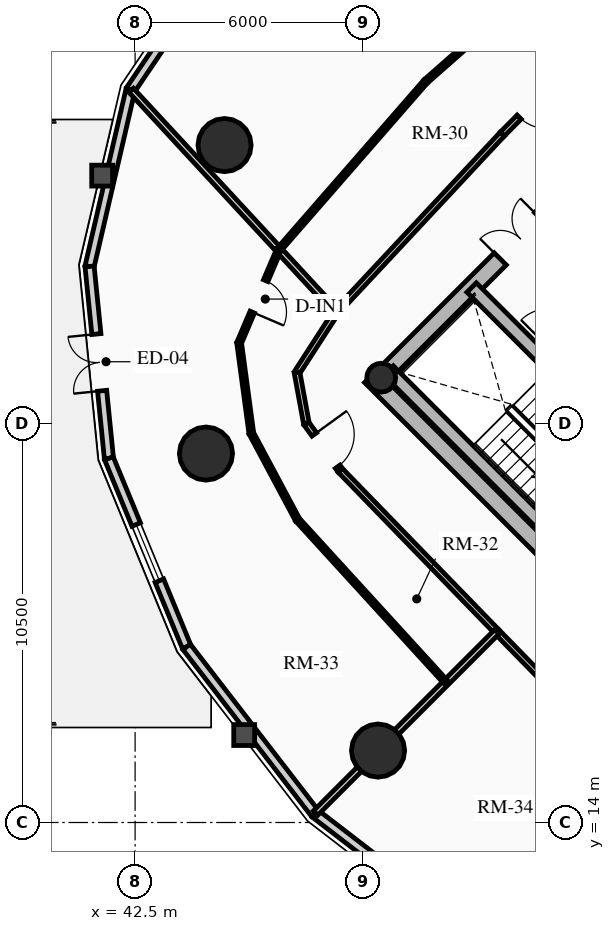
"""IFC4 building model, lengths in metres.
Left out: names, types, materials, properties, quantities, classifications, styles, units other than length and angle.
Written with IfcOpenShell. Run it as: python <this file> out.ifc"""

import sys

from ifc_helpers import new_model, si_unit, direction, frame, frame_2d, origin, origin_2d, place, context, subcontext, project, spatial, rectangle, circle, hollow_circle, extrude, source, transform, mapped, element, fill, save


model = new_model("IFC4")
c1 = context("Model", 3, precision=1e-05, world=origin(), true_north=direction((0.0, 1.0)))
c2 = subcontext(c1, "Body", "Model", "MODEL_VIEW")
j1 = project(units=[si_unit("LENGTHUNIT", "METRE"), si_unit("PLANEANGLEUNIT", "RADIAN")], contexts=[c1])
p1 = place(None, origin())
s1 = spatial("IfcSite", under=j1, at=p1, CompositionType="ELEMENT")
p2 = place(p1, origin())
s2 = spatial("IfcBuilding", under=s1, at=p2, CompositionType="ELEMENT")
p3 = place(p2, frame((0.0, 0.0, 144.04)))
s3 = spatial("IfcBuildingStorey", under=s2, at=p3, CompositionType="ELEMENT", Elevation=144.04)
p4 = place(p3, frame((58.737, 15.697, 0.0), z_axis=(0.0, 0.0, 1.0), x_axis=(-0.707106781187, 0.707106781187, 0.0)))
e1 = element("IfcWall", 1, at=p4, inside=s3, PredefinedType="SHEAR", context=c2, shape_type="SweptSolid", body=[
    extrude(rectangle(XDim=14.2, YDim=0.45, at=frame_2d((7.1, 0.0))), origin(), (0.0, 0.0, 1.0), 3.06),
])
p5 = place(p3, frame((48.856, 25.578, 0.0), z_axis=(0.0, 0.0, 1.0), x_axis=(0.707106781187, 0.707106781187, 0.0)))
e2 = element("IfcWall", 2, at=p5, inside=s3, PredefinedType="SHEAR", context=c2, shape_type="SweptSolid", body=[
    extrude(rectangle(XDim=10.7, YDim=0.45, at=frame_2d((5.35, 0.0))), origin(), (0.0, 0.0, 1.0), 3.06),
])
m1 = source(origin(), c2, "Body", "SweptSolid", [
    extrude(rectangle(XDim=1.5, YDim=2.02, at=frame_2d((0.75, 1.01))), frame((0.0, 0.235, 0.0), z_axis=(0.0, -1.0, 0.0), x_axis=(1.0, 0.0, 0.0)), (0.0, 0.0, 1.0), 0.47),
])
p6 = place(p5, frame((4.6, 0.0, 0.0)))
e3 = element("IfcOpeningElement", 3, at=p6, cuts=e2, PredefinedType="OPENING", context=c2, shape_type="MappedRepresentation", body=[
    mapped(m1, transform((0.0, 0.0, 0.0), x_axis=(1.0, 0.0, 0.0), y_axis=(0.0, 1.0, 0.0), z_axis=(0.0, 0.0, 1.0), scale=1.0)),
])
p7 = place(p3, frame((61.078, 18.355, 0.0), z_axis=(0.0, 0.0, 1.0), x_axis=(-0.707106781187, 0.707106781187, 0.0)))
e4 = element("IfcWall", 4, at=p7, inside=s3, PredefinedType="SHEAR", context=c2, shape_type="SweptSolid", body=[
    extrude(rectangle(XDim=13.75, YDim=0.35, at=frame_2d((6.875, 0.0))), origin(), (0.0, 0.0, 1.0), 3.06),
])
m2 = source(origin(), c2, "Body", "SweptSolid", [
    extrude(rectangle(XDim=1.1, YDim=2.015, at=frame_2d((0.55, 1.007))), frame((0.0, 0.185, 0.0), z_axis=(0.0, -1.0, 0.0), x_axis=(1.0, 0.0, 0.0)), (0.0, 0.0, 1.0), 0.37),
])
p8 = place(p7, frame((4.875, 0.0, 0.0)))
e5 = element("IfcOpeningElement", 5, at=p8, cuts=e4, PredefinedType="OPENING", context=c2, shape_type="MappedRepresentation", body=[
    mapped(m2, transform((0.0, 0.0, 0.0), x_axis=(1.0, 0.0, 0.0), y_axis=(0.0, 1.0, 0.0), z_axis=(0.0, 0.0, 1.0), scale=1.0)),
])
p9 = place(p7, frame((0.65, 0.0, 0.0)))
e6 = element("IfcOpeningElement", 6, at=p9, cuts=e4, PredefinedType="OPENING", context=c2, shape_type="MappedRepresentation", body=[
    mapped(m2, transform((0.0, 0.0, 0.0), x_axis=(1.0, 0.0, 0.0), y_axis=(0.0, 1.0, 0.0), z_axis=(0.0, 0.0, 1.0), scale=1.0)),
])
p10 = place(p7, frame((2.65, 0.0, 0.0)))
e7 = element("IfcOpeningElement", 7, at=p10, cuts=e4, PredefinedType="OPENING", context=c2, shape_type="MappedRepresentation", body=[
    mapped(m2, transform((0.0, 0.0, 0.0), x_axis=(1.0, 0.0, 0.0), y_axis=(0.0, 1.0, 0.0), z_axis=(0.0, 0.0, 1.0), scale=1.0)),
])
m3 = source(origin(), c2, "Body", "SweptSolid", [
    extrude(rectangle(XDim=1.15, YDim=2.02, at=frame_2d((0.575, 1.01))), frame((0.0, 0.185, 0.0), z_axis=(0.0, -1.0, 0.0), x_axis=(1.0, 0.0, 0.0)), (0.0, 0.0, 1.0), 0.37),
])
p11 = place(p7, frame((7.295, 0.0, 0.0)))
e8 = element("IfcOpeningElement", 8, at=p11, cuts=e4, PredefinedType="OPENING", context=c2, shape_type="MappedRepresentation", body=[
    mapped(m3, transform((0.0, 0.0, 0.0), x_axis=(1.0, 0.0, 0.0), y_axis=(0.0, 1.0, 0.0), z_axis=(0.0, 0.0, 1.0), scale=1.0)),
])
p12 = place(p3, frame((53.922, 21.141, 0.0), z_axis=(0.0, 0.0, 1.0), x_axis=(-0.707088616009, 0.707124945897, 0.0)))
e9 = element("IfcWall", 9, at=p12, inside=s3, PredefinedType="SHEAR", context=c2, shape_type="SweptSolid", body=[
    extrude(rectangle(XDim=6.72, YDim=0.35, at=frame_2d((3.36, 0.0))), origin(), (0.0, 0.0, 1.0), 3.06),
])
p13 = place(p3, frame((48.976, 25.706, 0.0), z_axis=(0.0, 0.0, 1.0), x_axis=(0.707106781187, 0.707106781187, 0.0)))
e10 = element("IfcColumn", 10, at=p13, inside=s3, PredefinedType="COLUMN", context=c2, shape_type="SweptSolid", body=[
    extrude(hollow_circle(Radius=0.38, WallThickness=0.032, at=origin_2d()), origin(), (0.0, 0.0, 1.0), 3.06),
])
for number, where, z_axis, x_axis in (
    (11, (44.854, 31.827, 0.0), (0.0, 0.0, 1.0), (1.0, 0.0, 0.0)),
    (12, (44.365, 23.709, 0.0), (0.0, 0.0, 1.0), (1.0, 0.0, 0.0)),
    (13, (48.893, 15.893, 0.0), (0.0, 0.0, 1.0), (1.0, 0.0, 0.0)),
):
    element("IfcColumn", number, at=place(p3, frame(where, z_axis=z_axis, x_axis=x_axis)), inside=s3, PredefinedType="USERDEFINED", context=c2, shape_type="SweptSolid", body=[
        extrude(circle(Radius=0.7, at=origin_2d()), origin(), (0.0, 0.0, 1.0), 3.06),
    ])
p14 = place(p3, frame((42.378, 33.279, 0.0), z_axis=(0.0, 0.0, 1.0), x_axis=(0.559635286042, 0.828739009952, 0.0)))
e14 = element("IfcWall", 14, at=p14, inside=s3, PredefinedType="SOLIDWALL", context=c2, shape_type="SweptSolid", body=[
    extrude(rectangle(XDim=4.569, YDim=0.24, at=frame_2d((2.284, 0.0))), origin(), (0.0, 0.0, 1.0), 2.229),
])
m4 = source(origin(), c2, "Body", "SweptSolid", [
    extrude(rectangle(XDim=1.6, YDim=1.3, at=frame_2d((0.8, 0.65))), frame((0.0, 0.13, 0.0), z_axis=(0.0, -1.0, 0.0), x_axis=(1.0, 0.0, 0.0)), (0.0, 0.0, 1.0), 0.26),
])
p15 = place(p14, frame((1.484, 0.0, 0.65)))
e15 = element("IfcOpeningElement", 15, at=p15, cuts=e14, PredefinedType="OPENING", context=c2, shape_type="MappedRepresentation", body=[
    mapped(m4, transform((0.0, 0.0, 0.0), x_axis=(1.0, 0.0, 0.0), y_axis=(0.0, 1.0, 0.0), z_axis=(0.0, 0.0, 1.0), scale=1.0)),
])
p16 = place(p3, frame((41.302, 28.633, 0.0), z_axis=(0.0, 0.0, 1.0), x_axis=(0.225659540039, 0.974206226622, 0.0)))
e16 = element("IfcWall", 16, at=p16, inside=s3, PredefinedType="SOLIDWALL", context=c2, shape_type="SweptSolid", body=[
    extrude(rectangle(XDim=4.769, YDim=0.24, at=frame_2d((2.385, 0.0))), origin(), (0.0, 0.0, 1.0), 2.229),
])
p17 = place(p3, frame((41.811, 23.582, 0.0), z_axis=(0.0, 0.0, 1.0), x_axis=(-0.100279889424, 0.994959267396, 0.0)))
e17 = element("IfcWall", 17, at=p17, inside=s3, PredefinedType="SOLIDWALL", context=c2, shape_type="SweptSolid", body=[
    extrude(rectangle(XDim=5.076, YDim=0.24, at=frame_2d((2.538, 0.0))), origin(), (0.0, 0.0, 1.0), 2.229),
])
m5 = source(origin(), c2, "Body", "SweptSolid", [
    extrude(rectangle(XDim=1.5, YDim=2.015, at=frame_2d((0.75, 1.007))), frame((0.0, 0.13, 0.0), z_axis=(0.0, -1.0, 0.0), x_axis=(1.0, 0.0, 0.0)), (0.0, 0.0, 1.0), 0.26),
])
p18 = place(p17, frame((1.788, 0.0, 0.0)))
e18 = element("IfcOpeningElement", 18, at=p18, cuts=e17, PredefinedType="OPENING", context=c2, shape_type="MappedRepresentation", body=[
    mapped(m5, transform((0.0, 0.0, 0.0), x_axis=(1.0, 0.0, 0.0), y_axis=(0.0, 1.0, 0.0), z_axis=(0.0, 0.0, 1.0), scale=1.0)),
])
p19 = place(p3, frame((43.856, 18.622, 0.0), z_axis=(0.0, 0.0, 1.0), x_axis=(-0.38111364655, 0.924528197738, 0.0)))
e19 = element("IfcWall", 19, at=p19, inside=s3, PredefinedType="SOLIDWALL", context=c2, shape_type="SweptSolid", body=[
    extrude(rectangle(XDim=5.366, YDim=0.24, at=frame_2d((2.683, 0.0))), origin(), (0.0, 0.0, 1.0), 2.229),
])
p20 = place(p19, frame((1.883, 0.0, 0.65)))
e20 = element("IfcOpeningElement", 20, at=p20, cuts=e19, PredefinedType="OPENING", context=c2, shape_type="MappedRepresentation", body=[
    mapped(m4, transform((0.0, 0.0, 0.0), x_axis=(1.0, 0.0, 0.0), y_axis=(0.0, 1.0, 0.0), z_axis=(0.0, 0.0, 1.0), scale=1.0)),
])
p21 = place(p3, frame((47.236, 14.236, 0.0), z_axis=(0.0, 0.0, 1.0), x_axis=(-0.610543584779, 0.791982658323, 0.0)))
e21 = element("IfcWall", 21, at=p21, inside=s3, PredefinedType="SOLIDWALL", context=c2, shape_type="SweptSolid", body=[
    extrude(rectangle(XDim=5.537, YDim=0.24, at=frame_2d((2.769, 0.0))), origin(), (0.0, 0.0, 1.0), 2.229),
])
p22 = place(p3, frame((51.622, 10.856, 0.0), z_axis=(0.0, 0.0, 1.0), x_axis=(-0.791982658323, 0.610543584779, 0.0)))
e22 = element("IfcWall", 22, at=p22, inside=s3, PredefinedType="SOLIDWALL", context=c2, shape_type="SweptSolid", body=[
    extrude(rectangle(XDim=5.537, YDim=0.24, at=frame_2d((2.769, 0.0))), origin(), (0.0, 0.0, 1.0), 2.229),
])
p23 = place(p22, frame((1.968, 0.0, 0.65)))
e23 = element("IfcOpeningElement", 23, at=p23, cuts=e22, PredefinedType="OPENING", context=c2, shape_type="MappedRepresentation", body=[
    mapped(m4, transform((0.0, 0.0, 0.0), x_axis=(1.0, 0.0, 0.0), y_axis=(0.0, 1.0, 0.0), z_axis=(0.0, 0.0, 1.0), scale=1.0)),
])
p24 = place(p3, frame((54.501, 34.479, 0.0), z_axis=(0.0, 0.0, 1.0), x_axis=(-0.70346073929, -0.710734119258, 0.0)))
e24 = element("IfcWall", 24, at=p24, inside=s3, PredefinedType="PARTITIONING", context=c2, shape_type="SweptSolid", body=[
    extrude(rectangle(XDim=3.323, YDim=0.15, at=frame_2d((1.662, 0.0))), origin(), (0.0, 0.0, 1.0), 2.275),
])
m6 = source(origin(), c2, "Body", "SweptSolid", [
    extrude(rectangle(XDim=1.05, YDim=2.015, at=frame_2d((0.525, 1.007))), frame((0.0, 0.085, 0.0), z_axis=(0.0, -1.0, 0.0), x_axis=(1.0, 0.0, 0.0)), (0.0, 0.0, 1.0), 0.17),
])
p25 = place(p24, frame((1.645, 0.0, 0.0)))
e25 = element("IfcOpeningElement", 25, at=p25, cuts=e24, PredefinedType="OPENING", context=c2, shape_type="MappedRepresentation", body=[
    mapped(m6, transform((0.0, 0.0, 0.0), x_axis=(1.0, 0.0, 0.0), y_axis=(0.0, 1.0, 0.0), z_axis=(0.0, 0.0, 1.0), scale=1.0)),
])
p26 = place(p3, frame((52.163, 32.117, 0.0), z_axis=(0.0, 0.0, 1.0), x_axis=(-0.682485296115, -0.730899323154, 0.0)))
e26 = element("IfcWall", 26, at=p26, inside=s3, PredefinedType="PARTITIONING", context=c2, shape_type="SweptSolid", body=[
    extrude(rectangle(XDim=6.404, YDim=0.15, at=frame_2d((3.202, 0.0))), origin(), (0.0, 0.0, 1.0), 2.275),
])
p27 = place(p3, frame((47.792, 27.436, 0.0), z_axis=(0.0, 0.0, 1.0), x_axis=(-0.543086162542, -0.839676973637, 0.0)))
e27 = element("IfcWall", 27, at=p27, inside=s3, PredefinedType="PARTITIONING", context=c2, shape_type="SweptSolid", body=[
    extrude(rectangle(XDim=1.901, YDim=0.15, at=frame_2d((0.95, 0.0))), origin(), (0.0, 0.0, 1.0), 2.275),
])
p28 = place(p3, frame((46.76, 25.84, 0.0), z_axis=(0.0, 0.0, 1.0), x_axis=(0.181230731673, -0.983440604153, 0.0)))
e28 = element("IfcWall", 28, at=p28, inside=s3, PredefinedType="PARTITIONING", context=c2, shape_type="SweptSolid", body=[
    extrude(rectangle(XDim=1.365, YDim=0.15, at=frame_2d((0.682, 0.0))), origin(), (0.0, 0.0, 1.0), 2.275),
])
p29 = place(p3, frame((47.008, 24.498, 0.0), z_axis=(0.0, 0.0, 1.0), x_axis=(0.586941299514, -0.809629489906, 0.0)))
e29 = element("IfcWall", 29, at=p29, inside=s3, PredefinedType="PARTITIONING", context=c2, shape_type="SweptSolid", body=[
    extrude(rectangle(XDim=1.523, YDim=0.15, at=frame_2d((0.761, 0.0))), origin(), (0.0, 0.0, 1.0), 2.275),
])
p30 = place(p29, frame((0.353, 0.0, 0.0)))
e30 = element("IfcOpeningElement", 30, at=p30, cuts=e29, PredefinedType="OPENING", context=c2, shape_type="MappedRepresentation", body=[
    mapped(m6, transform((0.0, 0.0, 0.0), x_axis=(1.0, 0.0, 0.0), y_axis=(0.0, 1.0, 0.0), z_axis=(0.0, 0.0, 1.0), scale=1.0)),
])
p31 = place(p3, frame((47.901, 23.265, 0.0), z_axis=(0.0, 0.0, 1.0), x_axis=(0.696355965374, -0.717696572019, 0.0)))
e31 = element("IfcWall", 31, at=p31, inside=s3, PredefinedType="PARTITIONING", context=c2, shape_type="SweptSolid", body=[
    extrude(rectangle(XDim=5.915, YDim=0.15, at=frame_2d((2.957, 0.0))), origin(), (0.0, 0.0, 1.0), 2.705),
])
p32 = place(p3, frame((52.02, 19.02, 0.0), z_axis=(0.0, 0.0, 1.0), x_axis=(0.699456449804, -0.71467522332, 0.0)))
e32 = element("IfcWall", 32, at=p32, inside=s3, PredefinedType="PARTITIONING", context=c2, shape_type="SweptSolid", body=[
    extrude(rectangle(XDim=6.032, YDim=0.15, at=frame_2d((3.016, 0.0))), origin(), (0.0, 0.0, 1.0), 2.275),
])
p33 = place(p3, frame((47.792, 27.436, 0.0), z_axis=(0.0, 0.0, 1.0), x_axis=(-0.679077160958, 0.734066897132, 0.0)))
e33 = element("IfcWall", 33, at=p33, inside=s3, PredefinedType="PARTITIONING", context=c2, shape_type="SweptSolid", body=[
    extrude(rectangle(XDim=7.947, YDim=0.16, at=frame_2d((3.974, 0.0))), origin(), (0.0, 0.0, 1.0), 2.229),
])
p34 = place(p3, frame((52.02, 19.02, 0.0), z_axis=(0.0, 0.0, 1.0), x_axis=(-0.707106781187, -0.707106781187, 0.0)))
e34 = element("IfcWall", 34, at=p34, inside=s3, PredefinedType="PARTITIONING", context=c2, shape_type="SweptSolid", body=[
    extrude(rectangle(XDim=6.745, YDim=0.16, at=frame_2d((3.373, 0.0))), origin(), (0.0, 0.0, 1.0), 2.229),
])
p35 = place(p3, frame((52.885, 35.914, 0.0), z_axis=(0.0, 0.0, 1.0), x_axis=(-0.750358205808, -0.66103143872, 0.0)))
e35 = element("IfcWall", 35, at=p35, inside=s3, PredefinedType="PARTITIONING", context=c2, shape_type="SweptSolid", body=[
    extrude(rectangle(XDim=3.654, YDim=0.125, at=frame_2d((1.827, 0.0))), origin(), (0.0, 0.0, 1.0), 2.275),
])
p36 = place(p3, frame((50.143, 33.498, 0.0), z_axis=(0.0, 0.0, 1.0), x_axis=(-0.657179989236, -0.753733680916, 0.0)))
e36 = element("IfcWall", 36, at=p36, inside=s3, PredefinedType="PARTITIONING", context=c2, shape_type="SweptSolid", body=[
    extrude(rectangle(XDim=5.876, YDim=0.125, at=frame_2d((2.938, 0.0))), origin(), (0.0, 0.0, 1.0), 2.275),
])
p37 = place(p3, frame((46.281, 29.069, 0.0), z_axis=(0.0, 0.0, 1.0), x_axis=(-0.392313487189, -0.919831575762, 0.0)))
e37 = element("IfcWall", 37, at=p37, inside=s3, PredefinedType="PARTITIONING", context=c2, shape_type="SweptSolid", body=[
    extrude(rectangle(XDim=2.662, YDim=0.125, at=frame_2d((1.331, 0.0))), origin(), (0.0, 0.0, 1.0), 2.275),
])
m7 = source(origin(), c2, "Body", "SweptSolid", [
    extrude(rectangle(XDim=0.9, YDim=2.005, at=frame_2d((0.45, 1.002))), frame((0.0, 0.073, 0.0), z_axis=(0.0, -1.0, 0.0), x_axis=(1.0, 0.0, 0.0)), (0.0, 0.0, 1.0), 0.145),
])
p38 = place(p37, frame((0.881, 0.0, 0.0)))
e38 = element("IfcOpeningElement", 38, at=p38, cuts=e37, PredefinedType="OPENING", context=c2, shape_type="MappedRepresentation", body=[
    mapped(m7, transform((0.0, 0.0, 0.0), x_axis=(1.0, 0.0, 0.0), y_axis=(0.0, 1.0, 0.0), z_axis=(0.0, 0.0, 1.0), scale=1.0)),
])
p39 = place(p3, frame((45.237, 26.621, 0.0), z_axis=(0.0, 0.0, 1.0), x_axis=(0.133669484876, -0.991025967779, 0.0)))
e39 = element("IfcWall", 39, at=p39, inside=s3, PredefinedType="PARTITIONING", context=c2, shape_type="SweptSolid", body=[
    extrude(rectangle(XDim=2.4, YDim=0.125, at=frame_2d((1.2, 0.0))), origin(), (0.0, 0.0, 1.0), 2.275),
])
p40 = place(p3, frame((45.558, 24.242, 0.0), z_axis=(0.0, 0.0, 1.0), x_axis=(0.471241457076, -0.88200424553, 0.0)))
e40 = element("IfcWall", 40, at=p40, inside=s3, PredefinedType="PARTITIONING", context=c2, shape_type="SweptSolid", body=[
    extrude(rectangle(XDim=2.58, YDim=0.125, at=frame_2d((1.29, 0.0))), origin(), (0.0, 0.0, 1.0), 2.275),
])
p41 = place(p3, frame((46.774, 21.967, 0.0), z_axis=(0.0, 0.0, 1.0), x_axis=(0.674324259609, -0.738435368129, 0.0)))
e41 = element("IfcWall", 41, at=p41, inside=s3, PredefinedType="PARTITIONING", context=c2, shape_type="SweptSolid", body=[
    extrude(rectangle(XDim=5.8, YDim=0.125, at=frame_2d((2.9, 0.0))), origin(), (0.0, 0.0, 1.0), 2.705),
])
m8 = source(origin(), c2, "Body", "SweptSolid", [
    extrude(rectangle(XDim=1.6, YDim=1.3, at=frame_2d((0.8, 0.65))), frame((0.0, 0.03, 0.0), z_axis=(0.0, -1.0, 0.0), x_axis=(1.0, 0.0, 0.0)), (0.0, 0.0, 1.0), 0.06),
])
p42 = place(p20, origin())
e42 = element("IfcWindow", 42, at=p42, inside=s3, PartitioningType="SINGLE_PANEL", PredefinedType="WINDOW", context=c2, shape_type="MappedRepresentation", body=[
    mapped(m8, transform((0.0, 0.0, 0.0), x_axis=(1.0, 0.0, 0.0), y_axis=(0.0, 1.0, 0.0), z_axis=(0.0, 0.0, 1.0), scale=1.0)),
])
fill(e20, e42)
m9 = source(origin(), c2, "Body", "SweptSolid", [
    extrude(rectangle(XDim=1.5, YDim=2.015, at=frame_2d((0.75, 1.007))), frame((0.0, 0.025, 0.0), z_axis=(0.0, -1.0, 0.0), x_axis=(1.0, 0.0, 0.0)), (0.0, 0.0, 1.0), 0.05),
])
p43 = place(p18, origin())
e43 = element("IfcDoor", 43, at=p43, inside=s3, OperationType="DOUBLE_DOOR_SINGLE_SWING", PredefinedType="DOOR", context=c2, shape_type="MappedRepresentation", body=[
    mapped(m9, transform((0.0, 0.0, 0.0), x_axis=(1.0, 0.0, 0.0), y_axis=(0.0, 1.0, 0.0), z_axis=(0.0, 0.0, 1.0), scale=1.0)),
])
fill(e18, e43)
m10 = source(origin(), c2, "Body", "SweptSolid", [
    extrude(rectangle(XDim=1.5, YDim=2.02, at=frame_2d((0.75, 1.01))), frame((0.0, 0.025, 0.0), z_axis=(0.0, -1.0, 0.0), x_axis=(1.0, 0.0, 0.0)), (0.0, 0.0, 1.0), 0.05),
])
p44 = place(p6, origin())
e44 = element("IfcDoor", 44, at=p44, inside=s3, OperationType="DOUBLE_DOOR_SINGLE_SWING", PredefinedType="DOOR", context=c2, shape_type="MappedRepresentation", body=[
    mapped(m10, transform((0.0, 0.0, 0.0), x_axis=(1.0, 0.0, 0.0), y_axis=(0.0, 1.0, 0.0), z_axis=(0.0, 0.0, 1.0), scale=1.0)),
])
fill(e3, e44)
m11 = source(origin(), c2, "Body", "SweptSolid", [
    extrude(rectangle(XDim=1.05, YDim=2.015, at=frame_2d((0.525, 1.007))), frame((0.0, 0.025, 0.0), z_axis=(0.0, -1.0, 0.0), x_axis=(1.0, 0.0, 0.0)), (0.0, 0.0, 1.0), 0.05),
])
p45 = place(p25, origin())
e45 = element("IfcDoor", 45, at=p45, inside=s3, OperationType="SINGLE_SWING_LEFT", PredefinedType="DOOR", context=c2, shape_type="MappedRepresentation", body=[
    mapped(m11, transform((0.0, 0.0, 0.0), x_axis=(1.0, 0.0, 0.0), y_axis=(0.0, 1.0, 0.0), z_axis=(0.0, 0.0, 1.0), scale=1.0)),
])
fill(e25, e45)
p46 = place(p30, origin())
e46 = element("IfcDoor", 46, at=p46, inside=s3, OperationType="SINGLE_SWING_LEFT", PredefinedType="DOOR", context=c2, shape_type="MappedRepresentation", body=[
    mapped(m11, transform((0.0, 0.0, 0.0), x_axis=(1.0, 0.0, 0.0), y_axis=(0.0, 1.0, 0.0), z_axis=(0.0, 0.0, 1.0), scale=1.0)),
])
fill(e30, e46)
m12 = source(origin(), c2, "Body", "SweptSolid", [
    extrude(rectangle(XDim=0.9, YDim=2.005, at=frame_2d((0.45, 1.002))), frame((0.0, 0.025, 0.0), z_axis=(0.0, -1.0, 0.0), x_axis=(1.0, 0.0, 0.0)), (0.0, 0.0, 1.0), 0.05),
])
p47 = place(p38, origin())
e47 = element("IfcDoor", 47, at=p47, inside=s3, OperationType="SINGLE_SWING_RIGHT", PredefinedType="DOOR", context=c2, shape_type="MappedRepresentation", body=[
    mapped(m12, transform((0.0, 0.0, 0.0), x_axis=(1.0, 0.0, 0.0), y_axis=(0.0, 1.0, 0.0), z_axis=(0.0, 0.0, 1.0), scale=1.0)),
])
fill(e38, e47)
save(model, sys.argv[1])
